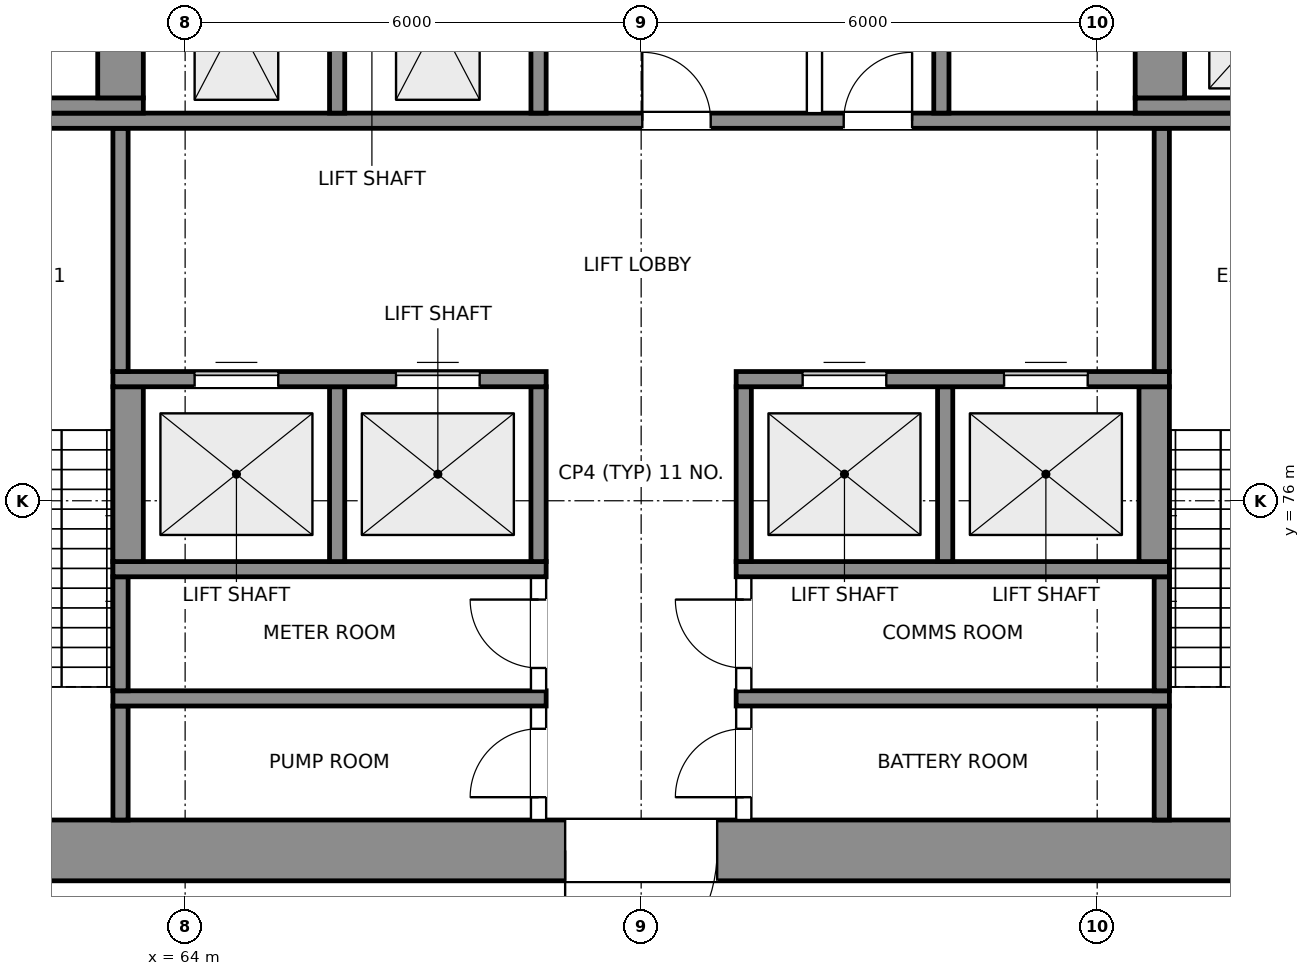
"""IFC4 building model, lengths in metres.
Left out: names, types, materials, properties, quantities, classifications, styles, units other than length and angle.
Written with IfcOpenShell. Run it as: python <this file> out.ifc"""

import sys

from ifc_helpers import new_model, si_unit, direction, frame, frame_2d, origin, place, context, subcontext, project, spatial, rectangle, extrude, element, fill, save


model = new_model("IFC4")
c1 = context("Model", 3, precision=1e-05, world=origin(), true_north=direction((0.0, 1.0)))
c2 = subcontext(c1, "Body", "Model", "MODEL_VIEW")
j1 = project(units=[si_unit("LENGTHUNIT", "METRE"), si_unit("PLANEANGLEUNIT", "RADIAN")], contexts=[c1])
p1 = place(None, origin())
s1 = spatial("IfcSite", under=j1, at=p1, CompositionType="ELEMENT")
p2 = place(p1, origin())
s2 = spatial("IfcBuilding", under=s1, at=p2, CompositionType="ELEMENT")
p3 = place(p2, frame((0.0, 0.0, 243.3)))
s3 = spatial("IfcBuildingStorey", under=s2, at=p3, CompositionType="ELEMENT", Elevation=243.3)
p4 = place(p3, frame((59.0, 71.4, 0.0), z_axis=(0.0, 0.0, 1.0), x_axis=(1.0, 0.0, 0.0)))
e1 = element("IfcWall", 1, at=p4, inside=s3, PredefinedType="SHEAR", context=c2, shape_type="SweptSolid", body=[
    extrude(rectangle(XDim=22.0, YDim=0.8, at=frame_2d((11.0, 0.0))), origin(), (0.0, 0.0, 1.0), 5.0),
])
p5 = place(p4, frame((2.025, 0.0, 0.0)))
e2 = element("IfcOpeningElement", 2, at=p5, cuts=e1, PredefinedType="OPENING", context=c2, shape_type="SweptSolid", body=[
    extrude(rectangle(XDim=1.2, YDim=2.1, at=frame_2d((0.6, 1.05))), frame((0.0, 0.41, 0.0), z_axis=(0.0, -1.0, 0.0), x_axis=(1.0, 0.0, 0.0)), (0.0, 0.0, 1.0), 0.82),
])
p6 = place(p4, frame((18.775, 0.0, 0.0)))
e3 = element("IfcOpeningElement", 3, at=p6, cuts=e1, PredefinedType="OPENING", context=c2, shape_type="SweptSolid", body=[
    extrude(rectangle(XDim=1.2, YDim=2.1, at=frame_2d((0.6, 1.05))), frame((0.0, 0.41, 0.0), z_axis=(0.0, -1.0, 0.0), x_axis=(1.0, 0.0, 0.0)), (0.0, 0.0, 1.0), 0.82),
])
p7 = place(p4, frame((10.0, 0.0, 0.0)))
e4 = element("IfcOpeningElement", 4, at=p7, cuts=e1, PredefinedType="OPENING", context=c2, shape_type="SweptSolid", body=[
    extrude(rectangle(XDim=2.0, YDim=2.1, at=frame_2d((1.0, 1.05))), frame((0.0, 0.41, 0.0), z_axis=(0.0, -1.0, 0.0), x_axis=(1.0, 0.0, 0.0)), (0.0, 0.0, 1.0), 0.82),
])
p8 = place(p3, frame((63.15, 71.8, 0.0), z_axis=(0.0, 0.0, 1.0), x_axis=(0.0, 1.0, 0.0)))
e5 = element("IfcWall", 5, at=p8, inside=s3, PredefinedType="SHEAR", context=c2, shape_type="SweptSolid", body=[
    extrude(rectangle(XDim=1.5, YDim=0.2, at=frame_2d((0.75, 0.0))), origin(), (0.0, 0.0, 1.0), 5.0),
])
p9 = place(p3, frame((68.65, 71.8, 0.0), z_axis=(0.0, 0.0, 1.0), x_axis=(0.0, 1.0, 0.0)))
e6 = element("IfcWall", 6, at=p9, inside=s3, PredefinedType="PARTITIONING", context=c2, shape_type="SweptSolid", body=[
    extrude(rectangle(XDim=1.5, YDim=0.2, at=frame_2d((0.75, 0.0))), origin(), (0.0, 0.0, 1.0), 4.7),
])
p10 = place(p9, frame((0.3, 0.0, 0.0)))
e7 = element("IfcOpeningElement", 7, at=p10, cuts=e6, PredefinedType="OPENING", context=c2, shape_type="SweptSolid", body=[
    extrude(rectangle(XDim=0.9, YDim=2.1, at=frame_2d((0.45, 1.05))), frame((0.0, 0.11, 0.0), z_axis=(0.0, -1.0, 0.0), x_axis=(1.0, 0.0, 0.0)), (0.0, 0.0, 1.0), 0.22),
])
p11 = place(p3, frame((71.35, 71.8, 0.0), z_axis=(0.0, 0.0, 1.0), x_axis=(0.0, 1.0, 0.0)))
e8 = element("IfcWall", 8, at=p11, inside=s3, PredefinedType="PARTITIONING", context=c2, shape_type="SweptSolid", body=[
    extrude(rectangle(XDim=1.5, YDim=0.2, at=frame_2d((0.75, 0.0))), origin(), (0.0, 0.0, 1.0), 4.7),
])
p12 = place(p11, frame((0.3, 0.0, 0.0)))
e9 = element("IfcOpeningElement", 9, at=p12, cuts=e8, PredefinedType="OPENING", context=c2, shape_type="SweptSolid", body=[
    extrude(rectangle(XDim=0.9, YDim=2.1, at=frame_2d((0.45, 1.05))), frame((0.0, 0.11, 0.0), z_axis=(0.0, -1.0, 0.0), x_axis=(1.0, 0.0, 0.0)), (0.0, 0.0, 1.0), 0.22),
])
p13 = place(p3, frame((76.85, 71.8, 0.0), z_axis=(0.0, 0.0, 1.0), x_axis=(0.0, 1.0, 0.0)))
e10 = element("IfcWall", 10, at=p13, inside=s3, PredefinedType="SHEAR", context=c2, shape_type="SweptSolid", body=[
    extrude(rectangle(XDim=1.5, YDim=0.2, at=frame_2d((0.75, 0.0))), origin(), (0.0, 0.0, 1.0), 5.0),
])
for number, where, z_axis, x_axis in (
    (11, (63.05, 73.4, 0.0), (0.0, 0.0, 1.0), (1.0, 0.0, 0.0)),
    (12, (71.25, 73.4, 0.0), (0.0, 0.0, 1.0), (1.0, 0.0, 0.0)),
):
    element("IfcWall", number, at=place(p3, frame(where, z_axis=z_axis, x_axis=x_axis)), inside=s3, PredefinedType="SHEAR", context=c2, shape_type="SweptSolid", body=[
        extrude(rectangle(XDim=5.7, YDim=0.2, at=frame_2d((2.85, 0.0))), origin(), (0.0, 0.0, 1.0), 5.0),
    ])
p14 = place(p3, frame((63.15, 73.5, 0.0), z_axis=(0.0, 0.0, 1.0), x_axis=(0.0, 1.0, 0.0)))
e13 = element("IfcWall", 13, at=p14, inside=s3, PredefinedType="SHEAR", context=c2, shape_type="SweptSolid", body=[
    extrude(rectangle(XDim=1.5, YDim=0.2, at=frame_2d((0.75, 0.0))), origin(), (0.0, 0.0, 1.0), 5.0),
])
p15 = place(p3, frame((68.65, 73.5, 0.0), z_axis=(0.0, 0.0, 1.0), x_axis=(0.0, 1.0, 0.0)))
e14 = element("IfcWall", 14, at=p15, inside=s3, PredefinedType="PARTITIONING", context=c2, shape_type="SweptSolid", body=[
    extrude(rectangle(XDim=1.5, YDim=0.2, at=frame_2d((0.75, 0.0))), origin(), (0.0, 0.0, 1.0), 4.7),
])
p16 = place(p15, frame((0.3, 0.0, 0.0)))
e15 = element("IfcOpeningElement", 15, at=p16, cuts=e14, PredefinedType="OPENING", context=c2, shape_type="SweptSolid", body=[
    extrude(rectangle(XDim=0.9, YDim=2.1, at=frame_2d((0.45, 1.05))), frame((0.0, 0.11, 0.0), z_axis=(0.0, -1.0, 0.0), x_axis=(1.0, 0.0, 0.0)), (0.0, 0.0, 1.0), 0.22),
])
p17 = place(p3, frame((71.35, 73.5, 0.0), z_axis=(0.0, 0.0, 1.0), x_axis=(0.0, 1.0, 0.0)))
e16 = element("IfcWall", 16, at=p17, inside=s3, PredefinedType="PARTITIONING", context=c2, shape_type="SweptSolid", body=[
    extrude(rectangle(XDim=1.5, YDim=0.2, at=frame_2d((0.75, 0.0))), origin(), (0.0, 0.0, 1.0), 4.7),
])
p18 = place(p17, frame((0.3, 0.0, 0.0)))
e17 = element("IfcOpeningElement", 17, at=p18, cuts=e16, PredefinedType="OPENING", context=c2, shape_type="SweptSolid", body=[
    extrude(rectangle(XDim=0.9, YDim=2.1, at=frame_2d((0.45, 1.05))), frame((0.0, 0.11, 0.0), z_axis=(0.0, -1.0, 0.0), x_axis=(1.0, 0.0, 0.0)), (0.0, 0.0, 1.0), 0.22),
])
p19 = place(p3, frame((76.85, 73.5, 0.0), z_axis=(0.0, 0.0, 1.0), x_axis=(0.0, 1.0, 0.0)))
e18 = element("IfcWall", 18, at=p19, inside=s3, PredefinedType="SHEAR", context=c2, shape_type="SweptSolid", body=[
    extrude(rectangle(XDim=1.5, YDim=0.2, at=frame_2d((0.75, 0.0))), origin(), (0.0, 0.0, 1.0), 5.0),
])
for number, where, z_axis, x_axis in (
    (19, (63.05, 75.1, 0.0), (0.0, 0.0, 1.0), (1.0, 0.0, 0.0)),
    (20, (71.25, 75.1, 0.0), (0.0, 0.0, 1.0), (1.0, 0.0, 0.0)),
):
    element("IfcWall", number, at=place(p3, frame(where, z_axis=z_axis, x_axis=x_axis)), inside=s3, PredefinedType="SHEAR", context=c2, shape_type="SweptSolid", body=[
        extrude(rectangle(XDim=5.7, YDim=0.2, at=frame_2d((2.85, 0.0))), origin(), (0.0, 0.0, 1.0), 5.0),
    ])
p20 = place(p3, frame((63.25, 75.2, 0.0), z_axis=(0.0, 0.0, 1.0), x_axis=(0.0, 1.0, 0.0)))
e21 = element("IfcWall", 21, at=p20, inside=s3, PredefinedType="SHEAR", context=c2, shape_type="SweptSolid", body=[
    extrude(rectangle(XDim=2.3, YDim=0.4, at=frame_2d((1.15, 0.0))), origin(), (0.0, 0.0, 1.0), 5.0),
])
for number, where, z_axis, x_axis in (
    (22, (66.0, 75.2, 0.0), (0.0, 0.0, 1.0), (0.0, 1.0, 0.0)),
    (23, (68.65, 75.2, 0.0), (0.0, 0.0, 1.0), (0.0, 1.0, 0.0)),
    (24, (71.35, 75.2, 0.0), (0.0, 0.0, 1.0), (0.0, 1.0, 0.0)),
    (25, (74.0, 75.2, 0.0), (0.0, 0.0, 1.0), (0.0, 1.0, 0.0)),
):
    element("IfcWall", number, at=place(p3, frame(where, z_axis=z_axis, x_axis=x_axis)), inside=s3, PredefinedType="SHEAR", context=c2, shape_type="SweptSolid", body=[
        extrude(rectangle(XDim=2.3, YDim=0.2, at=frame_2d((1.15, 0.0))), origin(), (0.0, 0.0, 1.0), 5.0),
    ])
p21 = place(p3, frame((76.75, 75.2, 0.0), z_axis=(0.0, 0.0, 1.0), x_axis=(0.0, 1.0, 0.0)))
e26 = element("IfcWall", 26, at=p21, inside=s3, PredefinedType="SHEAR", context=c2, shape_type="SweptSolid", body=[
    extrude(rectangle(XDim=2.3, YDim=0.4, at=frame_2d((1.15, 0.0))), origin(), (0.0, 0.0, 1.0), 5.0),
])
p22 = place(p3, frame((63.05, 77.6, 0.0), z_axis=(0.0, 0.0, 1.0), x_axis=(1.0, 0.0, 0.0)))
e27 = element("IfcWall", 27, at=p22, inside=s3, PredefinedType="SHEAR", context=c2, shape_type="SweptSolid", body=[
    extrude(rectangle(XDim=5.7, YDim=0.2, at=frame_2d((2.85, 0.0))), origin(), (0.0, 0.0, 1.0), 5.0),
])
p23 = place(p22, frame((1.075, 0.0, 0.0)))
e28 = element("IfcOpeningElement", 28, at=p23, cuts=e27, PredefinedType="OPENING", context=c2, shape_type="SweptSolid", body=[
    extrude(rectangle(XDim=1.1, YDim=2.1, at=frame_2d((0.55, 1.05))), frame((0.0, 0.11, 0.0), z_axis=(0.0, -1.0, 0.0), x_axis=(1.0, 0.0, 0.0)), (0.0, 0.0, 1.0), 0.22),
])
p24 = place(p22, frame((3.725, 0.0, 0.0)))
e29 = element("IfcOpeningElement", 29, at=p24, cuts=e27, PredefinedType="OPENING", context=c2, shape_type="SweptSolid", body=[
    extrude(rectangle(XDim=1.1, YDim=2.1, at=frame_2d((0.55, 1.05))), frame((0.0, 0.11, 0.0), z_axis=(0.0, -1.0, 0.0), x_axis=(1.0, 0.0, 0.0)), (0.0, 0.0, 1.0), 0.22),
])
p25 = place(p3, frame((71.25, 77.6, 0.0), z_axis=(0.0, 0.0, 1.0), x_axis=(1.0, 0.0, 0.0)))
e30 = element("IfcWall", 30, at=p25, inside=s3, PredefinedType="SHEAR", context=c2, shape_type="SweptSolid", body=[
    extrude(rectangle(XDim=5.7, YDim=0.2, at=frame_2d((2.85, 0.0))), origin(), (0.0, 0.0, 1.0), 5.0),
])
p26 = place(p25, frame((0.875, 0.0, 0.0)))
e31 = element("IfcOpeningElement", 31, at=p26, cuts=e30, PredefinedType="OPENING", context=c2, shape_type="SweptSolid", body=[
    extrude(rectangle(XDim=1.1, YDim=2.1, at=frame_2d((0.55, 1.05))), frame((0.0, 0.11, 0.0), z_axis=(0.0, -1.0, 0.0), x_axis=(1.0, 0.0, 0.0)), (0.0, 0.0, 1.0), 0.22),
])
p27 = place(p25, frame((3.525, 0.0, 0.0)))
e32 = element("IfcOpeningElement", 32, at=p27, cuts=e30, PredefinedType="OPENING", context=c2, shape_type="SweptSolid", body=[
    extrude(rectangle(XDim=1.1, YDim=2.1, at=frame_2d((0.55, 1.05))), frame((0.0, 0.11, 0.0), z_axis=(0.0, -1.0, 0.0), x_axis=(1.0, 0.0, 0.0)), (0.0, 0.0, 1.0), 0.22),
])
for number, where, z_axis, x_axis in (
    (33, (63.15, 77.7, 0.0), (0.0, 0.0, 1.0), (0.0, 1.0, 0.0)),
    (34, (76.85, 77.7, 0.0), (0.0, 0.0, 1.0), (0.0, 1.0, 0.0)),
):
    element("IfcWall", number, at=place(p3, frame(where, z_axis=z_axis, x_axis=x_axis)), inside=s3, PredefinedType="SHEAR", context=c2, shape_type="SweptSolid", body=[
        extrude(rectangle(XDim=3.2, YDim=0.2, at=frame_2d((1.6, 0.0))), origin(), (0.0, 0.0, 1.0), 5.0),
    ])
p28 = place(p3, frame((59.0, 81.0, 0.0), z_axis=(0.0, 0.0, 1.0), x_axis=(1.0, 0.0, 0.0)))
e35 = element("IfcWall", 35, at=p28, inside=s3, PredefinedType="SHEAR", context=c2, shape_type="SweptSolid", body=[
    extrude(rectangle(XDim=22.0, YDim=0.2, at=frame_2d((11.0, 0.0))), origin(), (0.0, 0.0, 1.0), 5.0),
])
p29 = place(p28, frame((11.015, 0.0, 0.0)))
e36 = element("IfcOpeningElement", 36, at=p29, cuts=e35, PredefinedType="OPENING", context=c2, shape_type="SweptSolid", body=[
    extrude(rectangle(XDim=0.9, YDim=2.1, at=frame_2d((0.45, 1.05))), frame((0.0, 0.11, 0.0), z_axis=(0.0, -1.0, 0.0), x_axis=(1.0, 0.0, 0.0)), (0.0, 0.0, 1.0), 0.22),
])
p30 = place(p28, frame((13.665, 0.0, 0.0)))
e37 = element("IfcOpeningElement", 37, at=p30, cuts=e35, PredefinedType="OPENING", context=c2, shape_type="SweptSolid", body=[
    extrude(rectangle(XDim=0.9, YDim=2.1, at=frame_2d((0.45, 1.05))), frame((0.0, 0.11, 0.0), z_axis=(0.0, -1.0, 0.0), x_axis=(1.0, 0.0, 0.0)), (0.0, 0.0, 1.0), 0.22),
])
p31 = place(p3, frame((59.0, 81.2, 0.0), z_axis=(0.0, 0.0, 1.0), x_axis=(1.0, 0.0, 0.0)))
e38 = element("IfcWall", 38, at=p31, inside=s3, PredefinedType="SHEAR", context=c2, shape_type="SweptSolid", body=[
    extrude(rectangle(XDim=4.45, YDim=0.2, at=frame_2d((2.225, 0.0))), origin(), (0.0, 0.0, 1.0), 5.0),
])
for number, where, z_axis, x_axis in (
    (39, (66.0, 81.1, 0.0), (0.0, 0.0, 1.0), (0.0, 1.0, 0.0)),
    (40, (68.65, 81.1, 0.0), (0.0, 0.0, 1.0), (0.0, 1.0, 0.0)),
):
    element("IfcWall", number, at=place(p3, frame(where, z_axis=z_axis, x_axis=x_axis)), inside=s3, PredefinedType="SHEAR", context=c2, shape_type="SweptSolid", body=[
        extrude(rectangle(XDim=2.45, YDim=0.2, at=frame_2d((1.225, 0.0))), origin(), (0.0, 0.0, 1.0), 5.0),
    ])
p32 = place(p3, frame((72.28, 81.1, 0.0), z_axis=(0.0, 0.0, 1.0), x_axis=(0.0, 1.0, 0.0)))
e41 = element("IfcWall", 41, at=p32, inside=s3, PredefinedType="PARTITIONING", context=c2, shape_type="SweptSolid", body=[
    extrude(rectangle(XDim=2.45, YDim=0.2, at=frame_2d((1.225, 0.0))), origin(), (0.0, 0.0, 1.0), 4.7),
])
p33 = place(p3, frame((73.95, 81.1, 0.0), z_axis=(0.0, 0.0, 1.0), x_axis=(0.0, 1.0, 0.0)))
e42 = element("IfcWall", 42, at=p33, inside=s3, PredefinedType="SHEAR", context=c2, shape_type="SweptSolid", body=[
    extrude(rectangle(XDim=2.45, YDim=0.2, at=frame_2d((1.225, 0.0))), origin(), (0.0, 0.0, 1.0), 5.0),
])
p34 = place(p3, frame((76.5, 81.2, 0.0), z_axis=(0.0, 0.0, 1.0), x_axis=(1.0, 0.0, 0.0)))
e43 = element("IfcWall", 43, at=p34, inside=s3, PredefinedType="SHEAR", context=c2, shape_type="SweptSolid", body=[
    extrude(rectangle(XDim=4.5, YDim=0.2, at=frame_2d((2.25, 0.0))), origin(), (0.0, 0.0, 1.0), 5.0),
])
p35 = place(p3, frame((63.15, 81.3, 0.0), z_axis=(0.0, 0.0, 1.0), x_axis=(0.0, 1.0, 0.0)))
e44 = element("IfcWall", 44, at=p35, inside=s3, PredefinedType="SHEAR", context=c2, shape_type="SweptSolid", body=[
    extrude(rectangle(XDim=2.25, YDim=0.6, at=frame_2d((1.125, 0.0))), origin(), (0.0, 0.0, 1.0), 5.0),
])
p36 = place(p3, frame((76.825, 81.3, 0.0), z_axis=(0.0, 0.0, 1.0), x_axis=(0.0, 1.0, 0.0)))
e45 = element("IfcWall", 45, at=p36, inside=s3, PredefinedType="SHEAR", context=c2, shape_type="SweptSolid", body=[
    extrude(rectangle(XDim=2.25, YDim=0.65, at=frame_2d((1.125, 0.0))), origin(), (0.0, 0.0, 1.0), 5.0),
])
p37 = place(p7, frame((2.0, 0.0, 0.0), z_axis=(0.0, 0.0, 1.0), x_axis=(-1.0, 0.0, 0.0)))
e46 = element("IfcDoor", 46, at=p37, inside=s3, OperationType="DOUBLE_DOOR_SINGLE_SWING", PredefinedType="DOOR", context=c2, shape_type="SweptSolid", body=[
    extrude(rectangle(XDim=2.0, YDim=2.1, at=frame_2d((1.0, 1.05))), frame((0.0, 0.025, 0.0), z_axis=(0.0, -1.0, 0.0), x_axis=(1.0, 0.0, 0.0)), (0.0, 0.0, 1.0), 0.05),
])
fill(e4, e46)
p38 = place(p10, origin())
e47 = element("IfcDoor", 47, at=p38, inside=s3, OperationType="SINGLE_SWING_LEFT", PredefinedType="DOOR", context=c2, shape_type="SweptSolid", body=[
    extrude(rectangle(XDim=0.9, YDim=2.1, at=frame_2d((0.45, 1.05))), frame((0.0, 0.025, 0.0), z_axis=(0.0, -1.0, 0.0), x_axis=(1.0, 0.0, 0.0)), (0.0, 0.0, 1.0), 0.05),
])
fill(e7, e47)
p39 = place(p16, origin())
e48 = element("IfcDoor", 48, at=p39, inside=s3, OperationType="SINGLE_SWING_RIGHT", PredefinedType="DOOR", context=c2, shape_type="SweptSolid", body=[
    extrude(rectangle(XDim=0.9, YDim=2.1, at=frame_2d((0.45, 1.05))), frame((0.0, 0.025, 0.0), z_axis=(0.0, -1.0, 0.0), x_axis=(1.0, 0.0, 0.0)), (0.0, 0.0, 1.0), 0.05),
])
fill(e15, e48)
p40 = place(p12, origin())
e49 = element("IfcDoor", 49, at=p40, inside=s3, OperationType="SINGLE_SWING_LEFT", PredefinedType="DOOR", context=c2, shape_type="SweptSolid", body=[
    extrude(rectangle(XDim=0.9, YDim=2.1, at=frame_2d((0.45, 1.05))), frame((0.0, 0.025, 0.0), z_axis=(0.0, -1.0, 0.0), x_axis=(1.0, 0.0, 0.0)), (0.0, 0.0, 1.0), 0.05),
])
fill(e9, e49)
p41 = place(p18, origin())
e50 = element("IfcDoor", 50, at=p41, inside=s3, OperationType="SINGLE_SWING_RIGHT", PredefinedType="DOOR", context=c2, shape_type="SweptSolid", body=[
    extrude(rectangle(XDim=0.9, YDim=2.1, at=frame_2d((0.45, 1.05))), frame((0.0, 0.025, 0.0), z_axis=(0.0, -1.0, 0.0), x_axis=(1.0, 0.0, 0.0)), (0.0, 0.0, 1.0), 0.05),
])
fill(e17, e50)
p42 = place(p23, origin())
e51 = element("IfcDoor", 51, at=p42, inside=s3, OperationType="DOUBLE_DOOR_SLIDING", PredefinedType="DOOR", context=c2, shape_type="SweptSolid", body=[
    extrude(rectangle(XDim=1.1, YDim=2.1, at=frame_2d((0.55, 1.05))), frame((0.0, 0.025, 0.0), z_axis=(0.0, -1.0, 0.0), x_axis=(1.0, 0.0, 0.0)), (0.0, 0.0, 1.0), 0.05),
])
fill(e28, e51)
p43 = place(p24, origin())
e52 = element("IfcDoor", 52, at=p43, inside=s3, OperationType="DOUBLE_DOOR_SLIDING", PredefinedType="DOOR", context=c2, shape_type="SweptSolid", body=[
    extrude(rectangle(XDim=1.1, YDim=2.1, at=frame_2d((0.55, 1.05))), frame((0.0, 0.025, 0.0), z_axis=(0.0, -1.0, 0.0), x_axis=(1.0, 0.0, 0.0)), (0.0, 0.0, 1.0), 0.05),
])
fill(e29, e52)
p44 = place(p26, origin())
e53 = element("IfcDoor", 53, at=p44, inside=s3, OperationType="DOUBLE_DOOR_SLIDING", PredefinedType="DOOR", context=c2, shape_type="SweptSolid", body=[
    extrude(rectangle(XDim=1.1, YDim=2.1, at=frame_2d((0.55, 1.05))), frame((0.0, 0.025, 0.0), z_axis=(0.0, -1.0, 0.0), x_axis=(1.0, 0.0, 0.0)), (0.0, 0.0, 1.0), 0.05),
])
fill(e31, e53)
p45 = place(p27, origin())
e54 = element("IfcDoor", 54, at=p45, inside=s3, OperationType="DOUBLE_DOOR_SLIDING", PredefinedType="DOOR", context=c2, shape_type="SweptSolid", body=[
    extrude(rectangle(XDim=1.1, YDim=2.1, at=frame_2d((0.55, 1.05))), frame((0.0, 0.025, 0.0), z_axis=(0.0, -1.0, 0.0), x_axis=(1.0, 0.0, 0.0)), (0.0, 0.0, 1.0), 0.05),
])
fill(e32, e54)
p46 = place(p29, origin())
e55 = element("IfcDoor", 55, at=p46, inside=s3, OperationType="SINGLE_SWING_LEFT", PredefinedType="DOOR", context=c2, shape_type="SweptSolid", body=[
    extrude(rectangle(XDim=0.9, YDim=2.1, at=frame_2d((0.45, 1.05))), frame((0.0, 0.025, 0.0), z_axis=(0.0, -1.0, 0.0), x_axis=(1.0, 0.0, 0.0)), (0.0, 0.0, 1.0), 0.05),
])
fill(e36, e55)
p47 = place(p30, origin())
e56 = element("IfcDoor", 56, at=p47, inside=s3, OperationType="SINGLE_SWING_RIGHT", PredefinedType="DOOR", context=c2, shape_type="SweptSolid", body=[
    extrude(rectangle(XDim=0.9, YDim=2.1, at=frame_2d((0.45, 1.05))), frame((0.0, 0.025, 0.0), z_axis=(0.0, -1.0, 0.0), x_axis=(1.0, 0.0, 0.0)), (0.0, 0.0, 1.0), 0.05),
])
fill(e37, e56)
save(model, sys.argv[1])
